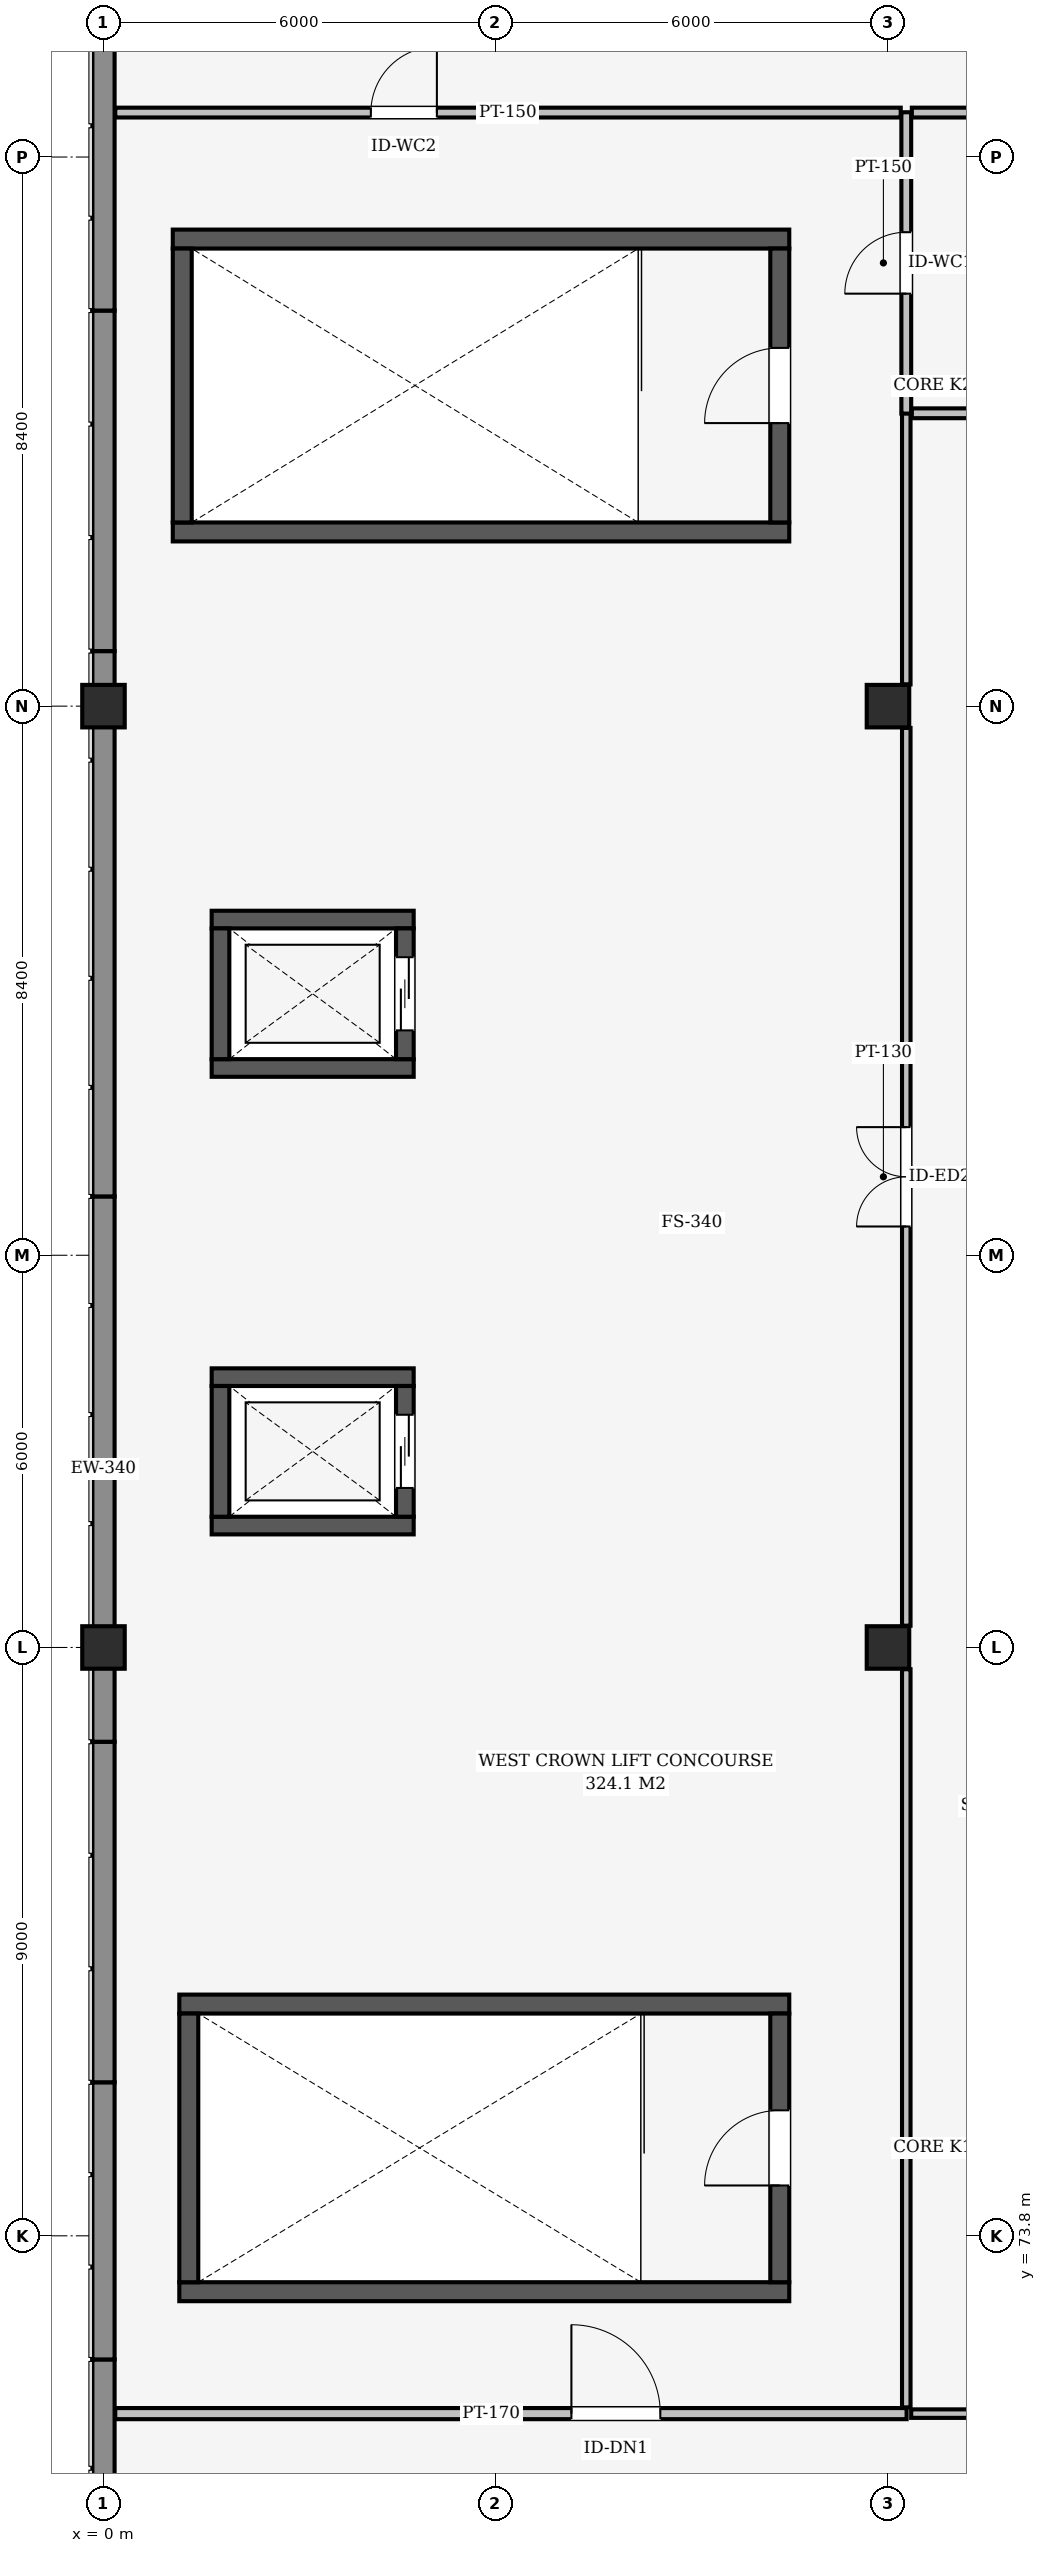
"""IFC4 building model, lengths in metres.
Left out: names, types, materials, properties, quantities, classifications, styles, units other than length and angle.
Written with IfcOpenShell. Run it as: python <this file> out.ifc"""

import sys

from ifc_helpers import new_model, si_unit, direction, frame, frame_2d, origin, origin_2d, place, context, subcontext, project, spatial, polyline, rectangle, outline, extrude, element, fill, save


model = new_model("IFC4")
c1 = context("Model", 3, precision=1e-05, world=origin(), true_north=direction((0.0, 1.0)))
c2 = subcontext(c1, "Body", "Model", "MODEL_VIEW")
j1 = project(units=[si_unit("LENGTHUNIT", "METRE"), si_unit("PLANEANGLEUNIT", "RADIAN")], contexts=[c1])
p1 = place(None, origin())
s1 = spatial("IfcSite", under=j1, at=p1, CompositionType="ELEMENT")
p2 = place(p1, origin())
s2 = spatial("IfcBuilding", under=s1, at=p2, CompositionType="ELEMENT")
p3 = place(p2, frame((0.0, 0.0, 22.2)))
s3 = spatial("IfcBuildingStorey", under=s2, at=p3, CompositionType="ELEMENT", Elevation=22.2)
for number, where, z_axis, x_axis in (
    (1, (0.0, 82.8, 0.0), (0.0, 0.0, 1.0), (1.0, 0.0, 0.0)),
    (2, (0.0, 97.2, 0.0), (0.0, 0.0, 1.0), (1.0, 0.0, 0.0)),
    (3, (12.0, 82.8, 0.0), (0.0, 0.0, 1.0), (1.0, 0.0, 0.0)),
    (4, (12.0, 97.2, 0.0), (0.0, 0.0, 1.0), (1.0, 0.0, 0.0)),
):
    element("IfcColumn", number, at=place(p3, frame(where, z_axis=z_axis, x_axis=x_axis)), inside=s3, PredefinedType="COLUMN", context=c2, shape_type="SweptSolid", body=[
        extrude(rectangle(XDim=0.65, YDim=0.65, at=origin_2d()), origin(), (0.0, 0.0, 1.0), 4.5),
    ])
p4 = place(p3, frame((0.0, 68.58, 0.0), z_axis=(0.0, 0.0, 1.0), x_axis=(0.0, 1.0, 0.0)))
e5 = element("IfcWall", 5, at=p4, inside=s3, PredefinedType="SOLIDWALL", context=c2, shape_type="SweptSolid", body=[
    extrude(outline(polyline([(0.0, 0.0), (3.329, 0.0), (3.329, 4.463), (0.0, 0.25), (0.0, 0.0)])), frame((0.0, 0.17, 0.0), z_axis=(0.0, -1.0, 0.0), x_axis=(1.0, 0.0, 0.0)), (0.0, 0.0, 1.0), 0.34),
])
p5 = place(p3, frame((0.0, 71.909, 0.0), z_axis=(0.0, 0.0, 1.0), x_axis=(0.0, 1.0, 0.0)))
e6 = element("IfcWall", 6, at=p5, inside=s3, PredefinedType="SOLIDWALL", context=c2, shape_type="SweptSolid", body=[
    extrude(outline(polyline([(0.0, 0.0), (4.24, 0.0), (4.24, 8.163), (0.0, 4.463), (0.0, 0.0)])), frame((0.0, 0.17, 0.0), z_axis=(0.0, -1.0, 0.0), x_axis=(1.0, 0.0, 0.0)), (0.0, 0.0, 1.0), 0.34),
])
p6 = place(p3, frame((0.0, 76.149, 0.0), z_axis=(0.0, 0.0, 1.0), x_axis=(0.0, 1.0, 0.0)))
e7 = element("IfcWall", 7, at=p6, inside=s3, PredefinedType="SOLIDWALL", context=c2, shape_type="SweptSolid", body=[
    extrude(outline(polyline([(0.0, 0.0), (5.209, 0.0), (5.209, 10.859), (0.0, 8.163), (0.0, 0.0)])), frame((0.0, 0.17, 0.0), z_axis=(0.0, -1.0, 0.0), x_axis=(1.0, 0.0, 0.0)), (0.0, 0.0, 1.0), 0.34),
])
p7 = place(p3, frame((0.0, 81.358, 0.0), z_axis=(0.0, 0.0, 1.0), x_axis=(0.0, 1.0, 0.0)))
e8 = element("IfcWall", 8, at=p7, inside=s3, PredefinedType="SOLIDWALL", context=c2, shape_type="SweptSolid", body=[
    extrude(outline(polyline([(0.0, 0.0), (8.342, 0.0), (8.342, 12.355), (0.0, 10.859), (0.0, 0.0)])), frame((0.0, 0.17, 0.0), z_axis=(0.0, -1.0, 0.0), x_axis=(1.0, 0.0, 0.0)), (0.0, 0.0, 1.0), 0.34),
])
p8 = place(p3, frame((0.0, 89.7, 0.0), z_axis=(0.0, 0.0, 1.0), x_axis=(0.0, 1.0, 0.0)))
e9 = element("IfcWall", 9, at=p8, inside=s3, PredefinedType="SOLIDWALL", context=c2, shape_type="SweptSolid", body=[
    extrude(outline(polyline([(0.0, 0.0), (8.342, 0.0), (8.342, 10.859), (0.0, 12.355), (0.0, 0.0)])), frame((0.0, 0.17, 0.0), z_axis=(0.0, -1.0, 0.0), x_axis=(1.0, 0.0, 0.0)), (0.0, 0.0, 1.0), 0.34),
])
p9 = place(p3, frame((0.0, 98.042, 0.0), z_axis=(0.0, 0.0, 1.0), x_axis=(0.0, 1.0, 0.0)))
e10 = element("IfcWall", 10, at=p9, inside=s3, PredefinedType="SOLIDWALL", context=c2, shape_type="SweptSolid", body=[
    extrude(outline(polyline([(0.0, 0.0), (5.209, 0.0), (5.209, 8.163), (0.0, 10.859), (0.0, 0.0)])), frame((0.0, 0.17, 0.0), z_axis=(0.0, -1.0, 0.0), x_axis=(1.0, 0.0, 0.0)), (0.0, 0.0, 1.0), 0.34),
])
p10 = place(p3, frame((0.0, 103.251, 0.0), z_axis=(0.0, 0.0, 1.0), x_axis=(0.0, 1.0, 0.0)))
e11 = element("IfcWall", 11, at=p10, inside=s3, PredefinedType="SOLIDWALL", context=c2, shape_type="SweptSolid", body=[
    extrude(outline(polyline([(0.0, 0.0), (4.24, 0.0), (4.24, 4.463), (0.0, 8.163), (0.0, 0.0)])), frame((0.0, 0.17, 0.0), z_axis=(0.0, -1.0, 0.0), x_axis=(1.0, 0.0, 0.0)), (0.0, 0.0, 1.0), 0.34),
])
for number, where, z_axis, x_axis in (
    (12, (1.16, 72.945, 0.0), (0.0, 0.0, 1.0), (1.0, 0.0, 0.0)),
    (13, (1.16, 77.345, 0.0), (0.0, 0.0, 1.0), (1.0, 0.0, 0.0)),
):
    element("IfcWall", number, at=place(p3, frame(where, z_axis=z_axis, x_axis=x_axis)), inside=s3, PredefinedType="SHEAR", context=c2, shape_type="SweptSolid", body=[
        extrude(rectangle(XDim=9.33, YDim=0.29, at=frame_2d((4.665, 0.0))), origin(), (0.0, 0.0, 1.0), 4.5),
    ])
p11 = place(p3, frame((1.305, 73.09, 0.0), z_axis=(0.0, 0.0, 1.0), x_axis=(0.0, 1.0, 0.0)))
e14 = element("IfcWall", 14, at=p11, inside=s3, PredefinedType="SHEAR", context=c2, shape_type="SweptSolid", body=[
    extrude(rectangle(XDim=4.11, YDim=0.29, at=frame_2d((2.055, 0.0))), origin(), (0.0, 0.0, 1.0), 4.5),
])
p12 = place(p3, frame((10.345, 73.09, 0.0), z_axis=(0.0, 0.0, 1.0), x_axis=(0.0, 1.0, 0.0)))
e15 = element("IfcWall", 15, at=p12, inside=s3, PredefinedType="SHEAR", context=c2, shape_type="SweptSolid", body=[
    extrude(rectangle(XDim=4.11, YDim=0.29, at=frame_2d((2.055, 0.0))), origin(), (0.0, 0.0, 1.0), 4.5),
])
p13 = place(p12, frame((1.48, 0.0, 0.0)))
e16 = element("IfcOpeningElement", 16, at=p13, cuts=e15, PredefinedType="OPENING", context=c2, shape_type="SweptSolid", body=[
    extrude(rectangle(XDim=1.15, YDim=2.15, at=frame_2d((0.575, 1.075))), frame((0.0, 0.155, 0.0), z_axis=(0.0, -1.0, 0.0), x_axis=(1.0, 0.0, 0.0)), (0.0, 0.0, 1.0), 0.31),
])
for number, where, z_axis, x_axis in (
    (17, (1.06, 99.865, 0.0), (0.0, 0.0, 1.0), (1.0, 0.0, 0.0)),
    (18, (1.06, 104.345, 0.0), (0.0, 0.0, 1.0), (1.0, 0.0, 0.0)),
):
    element("IfcWall", number, at=place(p3, frame(where, z_axis=z_axis, x_axis=x_axis)), inside=s3, PredefinedType="SHEAR", context=c2, shape_type="SweptSolid", body=[
        extrude(rectangle(XDim=9.43, YDim=0.29, at=frame_2d((4.715, 0.0))), origin(), (0.0, 0.0, 1.0), 4.5),
    ])
p14 = place(p3, frame((1.205, 100.01, 0.0), z_axis=(0.0, 0.0, 1.0), x_axis=(0.0, 1.0, 0.0)))
e19 = element("IfcWall", 19, at=p14, inside=s3, PredefinedType="SHEAR", context=c2, shape_type="SweptSolid", body=[
    extrude(rectangle(XDim=4.19, YDim=0.29, at=frame_2d((2.095, 0.0))), origin(), (0.0, 0.0, 1.0), 4.5),
])
p15 = place(p3, frame((10.345, 100.01, 0.0), z_axis=(0.0, 0.0, 1.0), x_axis=(0.0, 1.0, 0.0)))
e20 = element("IfcWall", 20, at=p15, inside=s3, PredefinedType="SHEAR", context=c2, shape_type="SweptSolid", body=[
    extrude(rectangle(XDim=4.19, YDim=0.29, at=frame_2d((2.095, 0.0))), origin(), (0.0, 0.0, 1.0), 4.5),
])
p16 = place(p15, frame((1.52, 0.0, 0.0)))
e21 = element("IfcOpeningElement", 21, at=p16, cuts=e20, PredefinedType="OPENING", context=c2, shape_type="SweptSolid", body=[
    extrude(rectangle(XDim=1.15, YDim=2.15, at=frame_2d((0.575, 1.075))), frame((0.0, 0.155, 0.0), z_axis=(0.0, -1.0, 0.0), x_axis=(1.0, 0.0, 0.0)), (0.0, 0.0, 1.0), 0.31),
])
for number, where, z_axis, x_axis in (
    (22, (1.655, 84.665, 0.0), (0.0, 0.0, 1.0), (1.0, 0.0, 0.0)),
    (23, (1.655, 86.935, 0.0), (0.0, 0.0, 1.0), (1.0, 0.0, 0.0)),
):
    element("IfcWall", number, at=place(p3, frame(where, z_axis=z_axis, x_axis=x_axis)), inside=s3, PredefinedType="SHEAR", context=c2, shape_type="SweptSolid", body=[
        extrude(rectangle(XDim=3.09, YDim=0.27, at=frame_2d((1.545, 0.0))), origin(), (0.0, 0.0, 1.0), 4.5),
    ])
p17 = place(p3, frame((1.79, 84.8, 0.0), z_axis=(0.0, 0.0, 1.0), x_axis=(0.0, 1.0, 0.0)))
e24 = element("IfcWall", 24, at=p17, inside=s3, PredefinedType="SHEAR", context=c2, shape_type="SweptSolid", body=[
    extrude(rectangle(XDim=2.0, YDim=0.27, at=frame_2d((1.0, 0.0))), origin(), (0.0, 0.0, 1.0), 4.5),
])
p18 = place(p3, frame((4.61, 84.8, 0.0), z_axis=(0.0, 0.0, 1.0), x_axis=(0.0, 1.0, 0.0)))
e25 = element("IfcWall", 25, at=p18, inside=s3, PredefinedType="SHEAR", context=c2, shape_type="SweptSolid", body=[
    extrude(rectangle(XDim=2.0, YDim=0.27, at=frame_2d((1.0, 0.0))), origin(), (0.0, 0.0, 1.0), 4.5),
])
p19 = place(p18, frame((0.44, 0.0, 0.0)))
e26 = element("IfcOpeningElement", 26, at=p19, cuts=e25, PredefinedType="OPENING", context=c2, shape_type="SweptSolid", body=[
    extrude(rectangle(XDim=1.12, YDim=2.15, at=frame_2d((0.56, 1.075))), frame((0.0, 0.145, 0.0), z_axis=(0.0, -1.0, 0.0), x_axis=(1.0, 0.0, 0.0)), (0.0, 0.0, 1.0), 0.29),
])
for number, where, z_axis, x_axis in (
    (27, (1.655, 91.665, 0.0), (0.0, 0.0, 1.0), (1.0, 0.0, 0.0)),
    (28, (1.655, 93.935, 0.0), (0.0, 0.0, 1.0), (1.0, 0.0, 0.0)),
):
    element("IfcWall", number, at=place(p3, frame(where, z_axis=z_axis, x_axis=x_axis)), inside=s3, PredefinedType="SHEAR", context=c2, shape_type="SweptSolid", body=[
        extrude(rectangle(XDim=3.09, YDim=0.27, at=frame_2d((1.545, 0.0))), origin(), (0.0, 0.0, 1.0), 4.5),
    ])
p20 = place(p3, frame((1.79, 91.8, 0.0), z_axis=(0.0, 0.0, 1.0), x_axis=(0.0, 1.0, 0.0)))
e29 = element("IfcWall", 29, at=p20, inside=s3, PredefinedType="SHEAR", context=c2, shape_type="SweptSolid", body=[
    extrude(rectangle(XDim=2.0, YDim=0.27, at=frame_2d((1.0, 0.0))), origin(), (0.0, 0.0, 1.0), 4.5),
])
p21 = place(p3, frame((4.61, 91.8, 0.0), z_axis=(0.0, 0.0, 1.0), x_axis=(0.0, 1.0, 0.0)))
e30 = element("IfcWall", 30, at=p21, inside=s3, PredefinedType="SHEAR", context=c2, shape_type="SweptSolid", body=[
    extrude(rectangle(XDim=2.0, YDim=0.27, at=frame_2d((1.0, 0.0))), origin(), (0.0, 0.0, 1.0), 4.5),
])
p22 = place(p21, frame((0.44, 0.0, 0.0)))
e31 = element("IfcOpeningElement", 31, at=p22, cuts=e30, PredefinedType="OPENING", context=c2, shape_type="SweptSolid", body=[
    extrude(rectangle(XDim=1.12, YDim=2.15, at=frame_2d((0.56, 1.075))), frame((0.0, 0.145, 0.0), z_axis=(0.0, -1.0, 0.0), x_axis=(1.0, 0.0, 0.0)), (0.0, 0.0, 1.0), 0.29),
])
p23 = place(p3, frame((0.18, 71.08, 0.0), z_axis=(0.0, 0.0, 1.0), x_axis=(1.0, 0.0, 0.0)))
e32 = element("IfcWall", 32, at=p23, inside=s3, PredefinedType="PARTITIONING", context=c2, shape_type="SweptSolid", body=[
    extrude(rectangle(XDim=12.105, YDim=0.17, at=frame_2d((6.052, 0.0))), origin(), (0.0, 0.0, 1.0), 4.5),
])
p24 = place(p23, frame((6.978, 0.0, 0.0)))
e33 = element("IfcOpeningElement", 33, at=p24, cuts=e32, PredefinedType="OPENING", context=c2, shape_type="SweptSolid", body=[
    extrude(rectangle(XDim=1.36, YDim=2.2, at=frame_2d((0.68, 1.1))), frame((0.0, 0.095, 0.0), z_axis=(0.0, -1.0, 0.0), x_axis=(1.0, 0.0, 0.0)), (0.0, 0.0, 1.0), 0.19),
])
p25 = place(p3, frame((12.28, 71.175, 0.0), z_axis=(0.0, 0.0, 1.0), x_axis=(0.0, 1.0, 0.0)))
e34 = element("IfcWall", 34, at=p25, inside=s3, PredefinedType="PARTITIONING", context=c2, shape_type="SweptSolid", body=[
    extrude(rectangle(XDim=11.292, YDim=0.13, at=frame_2d((5.646, 0.0))), origin(), (0.0, 0.0, 1.0), 4.5),
])
p26 = place(p3, frame((12.28, 83.133, 0.0), z_axis=(0.0, 0.0, 1.0), x_axis=(0.0, 1.0, 0.0)))
e35 = element("IfcWall", 35, at=p26, inside=s3, PredefinedType="PARTITIONING", context=c2, shape_type="SweptSolid", body=[
    extrude(rectangle(XDim=13.734, YDim=0.13, at=frame_2d((6.867, 0.0))), origin(), (0.0, 0.0, 1.0), 4.5),
])
p27 = place(p26, frame((6.107, 0.0, 0.0)))
e36 = element("IfcOpeningElement", 36, at=p27, cuts=e35, PredefinedType="OPENING", context=c2, shape_type="SweptSolid", body=[
    extrude(rectangle(XDim=1.52, YDim=2.24, at=frame_2d((0.76, 1.12))), frame((0.0, 0.075, 0.0), z_axis=(0.0, -1.0, 0.0), x_axis=(1.0, 0.0, 0.0)), (0.0, 0.0, 1.0), 0.15),
])
p28 = place(p3, frame((12.28, 97.533, 0.0), z_axis=(0.0, 0.0, 1.0), x_axis=(0.0, 1.0, 0.0)))
e37 = element("IfcWall", 37, at=p28, inside=s3, PredefinedType="PARTITIONING", context=c2, shape_type="SweptSolid", body=[
    extrude(rectangle(XDim=4.152, YDim=0.13, at=frame_2d((2.076, 0.0))), origin(), (0.0, 0.0, 1.0), 4.5),
])
p29 = place(p3, frame((12.28, 101.675, 0.0), z_axis=(0.0, 0.0, 1.0), x_axis=(0.0, 1.0, 0.0)))
e38 = element("IfcWall", 38, at=p29, inside=s3, PredefinedType="PARTITIONING", context=c2, shape_type="SweptSolid", body=[
    extrude(rectangle(XDim=4.61, YDim=0.15, at=frame_2d((2.305, 0.0))), origin(), (0.0, 0.0, 1.0), 4.5),
])
p30 = place(p29, frame((1.835, 0.0, 0.0)))
e39 = element("IfcOpeningElement", 39, at=p30, cuts=e38, PredefinedType="OPENING", context=c2, shape_type="SweptSolid", body=[
    extrude(rectangle(XDim=0.94, YDim=2.1, at=frame_2d((0.47, 1.05))), frame((0.0, 0.085, 0.0), z_axis=(0.0, -1.0, 0.0), x_axis=(1.0, 0.0, 0.0)), (0.0, 0.0, 1.0), 0.17),
])
p31 = place(p3, frame((0.18, 106.28, 0.0), z_axis=(0.0, 0.0, 1.0), x_axis=(1.0, 0.0, 0.0)))
e40 = element("IfcWall", 40, at=p31, inside=s3, PredefinedType="PARTITIONING", context=c2, shape_type="SweptSolid", body=[
    extrude(rectangle(XDim=12.015, YDim=0.15, at=frame_2d((6.008, 0.0))), origin(), (0.0, 0.0, 1.0), 4.5),
])
p32 = place(p31, frame((3.91, 0.0, 0.0)))
e41 = element("IfcOpeningElement", 41, at=p32, cuts=e40, PredefinedType="OPENING", context=c2, shape_type="SweptSolid", body=[
    extrude(rectangle(XDim=1.01, YDim=2.1, at=frame_2d((0.505, 1.05))), frame((0.0, 0.085, 0.0), z_axis=(0.0, -1.0, 0.0), x_axis=(1.0, 0.0, 0.0)), (0.0, 0.0, 1.0), 0.17),
])
p33 = place(p3, frame((12.355, 71.08, 0.0), z_axis=(0.0, 0.0, 1.0), x_axis=(1.0, 0.0, 0.0)))
e42 = element("IfcWall", 42, at=p33, inside=s3, PredefinedType="PARTITIONING", context=c2, shape_type="SweptSolid", body=[
    extrude(rectangle(XDim=4.975, YDim=0.13, at=frame_2d((2.488, 0.0))), origin(), (0.0, 0.0, 1.0), 4.5),
])
for number, where, z_axis, x_axis in (
    (43, (12.365, 101.68, 0.0), (0.0, 0.0, 1.0), (1.0, 0.0, 0.0)),
    (44, (12.365, 106.28, 0.0), (0.0, 0.0, 1.0), (1.0, 0.0, 0.0)),
):
    element("IfcWall", number, at=place(p3, frame(where, z_axis=z_axis, x_axis=x_axis)), inside=s3, PredefinedType="PARTITIONING", context=c2, shape_type="SweptSolid", body=[
        extrude(rectangle(XDim=4.965, YDim=0.15, at=frame_2d((2.482, 0.0))), origin(), (0.0, 0.0, 1.0), 4.5),
    ])
p34 = place(p13, origin())
e45 = element("IfcDoor", 45, at=p34, inside=s3, OperationType="SINGLE_SWING_LEFT", PredefinedType="DOOR", context=c2, shape_type="SweptSolid", body=[
    extrude(rectangle(XDim=1.15, YDim=2.15, at=frame_2d((0.575, 1.075))), frame((0.0, 0.025, 0.0), z_axis=(0.0, -1.0, 0.0), x_axis=(1.0, 0.0, 0.0)), (0.0, 0.0, 1.0), 0.05),
])
fill(e16, e45)
p35 = place(p16, origin())
e46 = element("IfcDoor", 46, at=p35, inside=s3, OperationType="SINGLE_SWING_LEFT", PredefinedType="DOOR", context=c2, shape_type="SweptSolid", body=[
    extrude(rectangle(XDim=1.15, YDim=2.15, at=frame_2d((0.575, 1.075))), frame((0.0, 0.025, 0.0), z_axis=(0.0, -1.0, 0.0), x_axis=(1.0, 0.0, 0.0)), (0.0, 0.0, 1.0), 0.05),
])
fill(e21, e46)
p36 = place(p19, origin())
e47 = element("IfcDoor", 47, at=p36, inside=s3, OperationType="SLIDING_TO_LEFT", PredefinedType="DOOR", context=c2, shape_type="SweptSolid", body=[
    extrude(rectangle(XDim=1.12, YDim=2.15, at=frame_2d((0.56, 1.075))), frame((0.0, 0.025, 0.0), z_axis=(0.0, -1.0, 0.0), x_axis=(1.0, 0.0, 0.0)), (0.0, 0.0, 1.0), 0.05),
])
fill(e26, e47)
p37 = place(p22, origin())
e48 = element("IfcDoor", 48, at=p37, inside=s3, OperationType="SLIDING_TO_LEFT", PredefinedType="DOOR", context=c2, shape_type="SweptSolid", body=[
    extrude(rectangle(XDim=1.12, YDim=2.15, at=frame_2d((0.56, 1.075))), frame((0.0, 0.025, 0.0), z_axis=(0.0, -1.0, 0.0), x_axis=(1.0, 0.0, 0.0)), (0.0, 0.0, 1.0), 0.05),
])
fill(e31, e48)
p38 = place(p24, origin())
e49 = element("IfcDoor", 49, at=p38, inside=s3, OperationType="SINGLE_SWING_LEFT", PredefinedType="DOOR", context=c2, shape_type="SweptSolid", body=[
    extrude(rectangle(XDim=1.36, YDim=2.2, at=frame_2d((0.68, 1.1))), frame((0.0, 0.025, 0.0), z_axis=(0.0, -1.0, 0.0), x_axis=(1.0, 0.0, 0.0)), (0.0, 0.0, 1.0), 0.05),
])
fill(e33, e49)
p39 = place(p27, origin())
e50 = element("IfcDoor", 50, at=p39, inside=s3, OperationType="DOUBLE_DOOR_SINGLE_SWING", PredefinedType="DOOR", context=c2, shape_type="SweptSolid", body=[
    extrude(rectangle(XDim=1.52, YDim=2.24, at=frame_2d((0.76, 1.12))), frame((0.0, 0.025, 0.0), z_axis=(0.0, -1.0, 0.0), x_axis=(1.0, 0.0, 0.0)), (0.0, 0.0, 1.0), 0.05),
])
fill(e36, e50)
p40 = place(p30, origin())
e51 = element("IfcDoor", 51, at=p40, inside=s3, OperationType="SINGLE_SWING_LEFT", PredefinedType="DOOR", context=c2, shape_type="SweptSolid", body=[
    extrude(rectangle(XDim=0.94, YDim=2.1, at=frame_2d((0.47, 1.05))), frame((0.0, 0.025, 0.0), z_axis=(0.0, -1.0, 0.0), x_axis=(1.0, 0.0, 0.0)), (0.0, 0.0, 1.0), 0.05),
])
fill(e39, e51)
p41 = place(p32, origin())
e52 = element("IfcDoor", 52, at=p41, inside=s3, OperationType="SINGLE_SWING_RIGHT", PredefinedType="DOOR", context=c2, shape_type="SweptSolid", body=[
    extrude(rectangle(XDim=1.01, YDim=2.1, at=frame_2d((0.505, 1.05))), frame((0.0, 0.025, 0.0), z_axis=(0.0, -1.0, 0.0), x_axis=(1.0, 0.0, 0.0)), (0.0, 0.0, 1.0), 0.05),
])
fill(e41, e52)
save(model, sys.argv[1])
